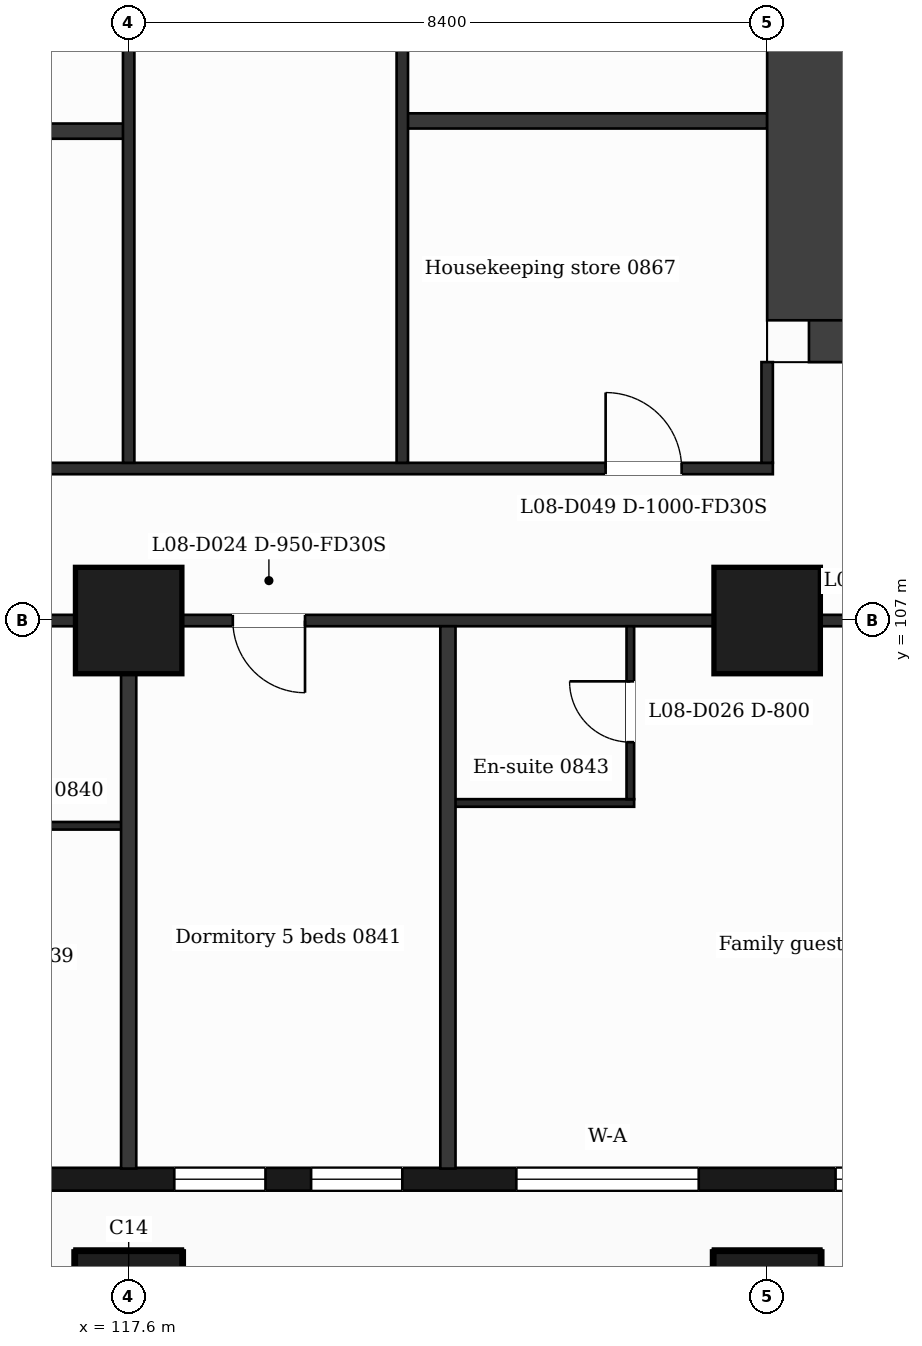
"""IFC4 building model, lengths in metres.
Left out: names, types, materials, properties, quantities, classifications, styles, units other than length and angle.
Written with IfcOpenShell. Run it as: python <this file> out.ifc"""

import sys

from ifc_helpers import new_model, si_unit, direction, frame, frame_2d, origin, origin_2d, place, context, subcontext, project, spatial, rectangle, extrude, element, fill, save


model = new_model("IFC4")
c1 = context("Model", 3, precision=1e-05, world=origin(), true_north=direction((0.0, 1.0)))
c2 = subcontext(c1, "Body", "Model", "MODEL_VIEW")
j1 = project(units=[si_unit("LENGTHUNIT", "METRE"), si_unit("PLANEANGLEUNIT", "RADIAN")], contexts=[c1])
p1 = place(None, origin())
s1 = spatial("IfcSite", under=j1, at=p1, CompositionType="ELEMENT")
p2 = place(p1, origin())
s2 = spatial("IfcBuilding", under=s1, at=p2, CompositionType="ELEMENT")
p3 = place(p2, frame((0.0, 0.0, 46.0)))
s3 = spatial("IfcBuildingStorey", under=s2, at=p3, CompositionType="ELEMENT", Elevation=46.0)
p4 = place(p3, frame((140.502, 110.95, 0.0), z_axis=(0.0, 0.0, 1.0), x_axis=(-1.0, 0.0, 0.0)))
e1 = element("IfcWall", 1, at=p4, inside=s3, PredefinedType="SHEAR", context=c2, shape_type="SweptSolid", body=[
    extrude(rectangle(XDim=13.952, YDim=1.1, at=frame_2d((6.976, 0.0))), origin(), (0.0, 0.0, 1.0), 3.5),
])
p5 = place(p4, frame((6.804, 0.0, 0.0)))
e2 = element("IfcOpeningElement", 2, at=p5, cuts=e1, PredefinedType="OPENING", context=c2, shape_type="SweptSolid", body=[
    extrude(rectangle(XDim=1.4, YDim=2.1, at=frame_2d((0.7, 1.05))), frame((0.0, 0.56, 0.0), z_axis=(0.0, -1.0, 0.0), x_axis=(1.0, 0.0, 0.0)), (0.0, 0.0, 1.0), 1.12),
])
p6 = place(p3, frame((126.55, 110.95, 0.0), z_axis=(0.0, 0.0, 1.0), x_axis=(0.0, 1.0, 0.0)))
e3 = element("IfcWall", 3, at=p6, inside=s3, PredefinedType="SHEAR", context=c2, shape_type="SweptSolid", body=[
    extrude(rectangle(XDim=20.9, YDim=1.1, at=frame_2d((10.45, 0.0))), origin(), (0.0, 0.0, 1.0), 3.5),
])
p7 = place(p6, frame((11.8, 0.0, 0.0)))
e4 = element("IfcOpeningElement", 4, at=p7, cuts=e3, PredefinedType="OPENING", context=c2, shape_type="SweptSolid", body=[
    extrude(rectangle(XDim=1.4, YDim=2.1, at=frame_2d((0.7, 1.05))), frame((0.0, 0.56, 0.0), z_axis=(0.0, -1.0, 0.0), x_axis=(1.0, 0.0, 0.0)), (0.0, 0.0, 1.0), 1.12),
])
for number, where, z_axis, x_axis in (
    (5, (117.6, 98.0, 0.0), (0.0, 0.0, 1.0), (1.0, 0.0, 0.0)),
    (6, (126.0, 98.0, 0.0), (0.0, 0.0, 1.0), (1.0, 0.0, 0.0)),
    (7, (117.6, 107.0, 0.0), (0.0, 0.0, 1.0), (1.0, 0.0, 0.0)),
    (8, (126.0, 107.0, 0.0), (0.0, 0.0, 1.0), (1.0, 0.0, 0.0)),
):
    element("IfcColumn", number, at=place(p3, frame(where, z_axis=z_axis, x_axis=x_axis)), inside=s3, PredefinedType="COLUMN", context=c2, shape_type="SweptSolid", body=[
        extrude(rectangle(XDim=1.4, YDim=1.4, at=origin_2d()), origin(), (0.0, 0.0, 1.0), 3.5),
    ])
p8 = place(p3, frame((89.85, 99.65, 0.0), z_axis=(0.0, 0.0, 1.0), x_axis=(1.0, 0.0, 0.0)))
e9 = element("IfcWall", 9, at=p8, inside=s3, PredefinedType="SOLIDWALL", context=c2, shape_type="SweptSolid", body=[
    extrude(rectangle(XDim=47.25, YDim=0.3, at=frame_2d((23.625, 0.0))), origin(), (0.0, 0.0, 1.0), 3.18),
])
p9 = place(p8, frame((0.725, 0.0, 0.9)))
e10 = element("IfcOpeningElement", 10, at=p9, cuts=e9, PredefinedType="OPENING", context=c2, shape_type="SweptSolid", body=[
    extrude(rectangle(XDim=1.2, YDim=2.1, at=frame_2d((0.6, 1.05))), frame((0.0, 0.16, 0.0), z_axis=(0.0, -1.0, 0.0), x_axis=(1.0, 0.0, 0.0)), (0.0, 0.0, 1.0), 0.32),
])
p10 = place(p8, frame((3.45, 0.0, 0.9)))
e11 = element("IfcOpeningElement", 11, at=p10, cuts=e9, PredefinedType="OPENING", context=c2, shape_type="SweptSolid", body=[
    extrude(rectangle(XDim=2.4, YDim=2.1, at=frame_2d((1.2, 1.05))), frame((0.0, 0.16, 0.0), z_axis=(0.0, -1.0, 0.0), x_axis=(1.0, 0.0, 0.0)), (0.0, 0.0, 1.0), 0.32),
])
p11 = place(p8, frame((7.65, 0.0, 0.9)))
e12 = element("IfcOpeningElement", 12, at=p11, cuts=e9, PredefinedType="OPENING", context=c2, shape_type="SweptSolid", body=[
    extrude(rectangle(XDim=2.4, YDim=2.1, at=frame_2d((1.2, 1.05))), frame((0.0, 0.16, 0.0), z_axis=(0.0, -1.0, 0.0), x_axis=(1.0, 0.0, 0.0)), (0.0, 0.0, 1.0), 0.32),
])
p12 = place(p8, frame((12.45, 0.0, 0.9)))
e13 = element("IfcOpeningElement", 13, at=p12, cuts=e9, PredefinedType="OPENING", context=c2, shape_type="SweptSolid", body=[
    extrude(rectangle(XDim=1.2, YDim=2.1, at=frame_2d((0.6, 1.05))), frame((0.0, 0.16, 0.0), z_axis=(0.0, -1.0, 0.0), x_axis=(1.0, 0.0, 0.0)), (0.0, 0.0, 1.0), 0.32),
])
p13 = place(p8, frame((16.65, 0.0, 0.9)))
e14 = element("IfcOpeningElement", 14, at=p13, cuts=e9, PredefinedType="OPENING", context=c2, shape_type="SweptSolid", body=[
    extrude(rectangle(XDim=1.2, YDim=2.1, at=frame_2d((0.6, 1.05))), frame((0.0, 0.16, 0.0), z_axis=(0.0, -1.0, 0.0), x_axis=(1.0, 0.0, 0.0)), (0.0, 0.0, 1.0), 0.32),
])
p14 = place(p8, frame((19.95, 0.0, 0.9)))
e15 = element("IfcOpeningElement", 15, at=p14, cuts=e9, PredefinedType="OPENING", context=c2, shape_type="SweptSolid", body=[
    extrude(rectangle(XDim=1.2, YDim=2.1, at=frame_2d((0.6, 1.05))), frame((0.0, 0.16, 0.0), z_axis=(0.0, -1.0, 0.0), x_axis=(1.0, 0.0, 0.0)), (0.0, 0.0, 1.0), 0.32),
])
p15 = place(p8, frame((21.75, 0.0, 0.9)))
e16 = element("IfcOpeningElement", 16, at=p15, cuts=e9, PredefinedType="OPENING", context=c2, shape_type="SweptSolid", body=[
    extrude(rectangle(XDim=1.2, YDim=2.1, at=frame_2d((0.6, 1.05))), frame((0.0, 0.16, 0.0), z_axis=(0.0, -1.0, 0.0), x_axis=(1.0, 0.0, 0.0)), (0.0, 0.0, 1.0), 0.32),
])
p16 = place(p8, frame((25.05, 0.0, 0.0)))
e17 = element("IfcOpeningElement", 17, at=p16, cuts=e9, PredefinedType="OPENING", context=c2, shape_type="SweptSolid", body=[
    extrude(rectangle(XDim=1.2, YDim=2.4, at=frame_2d((0.6, 1.2))), frame((0.0, 0.16, 0.0), z_axis=(0.0, -1.0, 0.0), x_axis=(1.0, 0.0, 0.0)), (0.0, 0.0, 1.0), 0.32),
])
p17 = place(p8, frame((28.35, 0.0, 0.9)))
e18 = element("IfcOpeningElement", 18, at=p17, cuts=e9, PredefinedType="OPENING", context=c2, shape_type="SweptSolid", body=[
    extrude(rectangle(XDim=1.2, YDim=2.1, at=frame_2d((0.6, 1.05))), frame((0.0, 0.16, 0.0), z_axis=(0.0, -1.0, 0.0), x_axis=(1.0, 0.0, 0.0)), (0.0, 0.0, 1.0), 0.32),
])
p18 = place(p8, frame((30.15, 0.0, 0.9)))
e19 = element("IfcOpeningElement", 19, at=p18, cuts=e9, PredefinedType="OPENING", context=c2, shape_type="SweptSolid", body=[
    extrude(rectangle(XDim=1.2, YDim=2.1, at=frame_2d((0.6, 1.05))), frame((0.0, 0.16, 0.0), z_axis=(0.0, -1.0, 0.0), x_axis=(1.0, 0.0, 0.0)), (0.0, 0.0, 1.0), 0.32),
])
p19 = place(p8, frame((32.85, 0.0, 0.9)))
e20 = element("IfcOpeningElement", 20, at=p19, cuts=e9, PredefinedType="OPENING", context=c2, shape_type="SweptSolid", body=[
    extrude(rectangle(XDim=2.4, YDim=2.1, at=frame_2d((1.2, 1.05))), frame((0.0, 0.16, 0.0), z_axis=(0.0, -1.0, 0.0), x_axis=(1.0, 0.0, 0.0)), (0.0, 0.0, 1.0), 0.32),
])
p20 = place(p8, frame((37.05, 0.0, 0.9)))
e21 = element("IfcOpeningElement", 21, at=p20, cuts=e9, PredefinedType="OPENING", context=c2, shape_type="SweptSolid", body=[
    extrude(rectangle(XDim=2.4, YDim=2.1, at=frame_2d((1.2, 1.05))), frame((0.0, 0.16, 0.0), z_axis=(0.0, -1.0, 0.0), x_axis=(1.0, 0.0, 0.0)), (0.0, 0.0, 1.0), 0.32),
])
p21 = place(p8, frame((41.85, 0.0, 0.9)))
e22 = element("IfcOpeningElement", 22, at=p21, cuts=e9, PredefinedType="OPENING", context=c2, shape_type="SweptSolid", body=[
    extrude(rectangle(XDim=1.2, YDim=2.1, at=frame_2d((0.6, 1.05))), frame((0.0, 0.16, 0.0), z_axis=(0.0, -1.0, 0.0), x_axis=(1.0, 0.0, 0.0)), (0.0, 0.0, 1.0), 0.32),
])
p22 = place(p8, frame((45.25, 0.0, 0.9)))
e23 = element("IfcOpeningElement", 23, at=p22, cuts=e9, PredefinedType="OPENING", context=c2, shape_type="SweptSolid", body=[
    extrude(rectangle(XDim=1.2, YDim=2.1, at=frame_2d((0.6, 1.05))), frame((0.0, 0.16, 0.0), z_axis=(0.0, -1.0, 0.0), x_axis=(1.0, 0.0, 0.0)), (0.0, 0.0, 1.0), 0.32),
])
p23 = place(p3, frame((115.15, 104.3, 0.0), z_axis=(0.0, 0.0, 1.0), x_axis=(1.0, 0.0, 0.0)))
e24 = element("IfcWall", 24, at=p23, inside=s3, PredefinedType="PARTITIONING", context=c2, shape_type="SweptSolid", body=[
    extrude(rectangle(XDim=2.45, YDim=0.1, at=frame_2d((1.225, 0.0))), origin(), (0.0, 0.0, 1.0), 3.18),
])
p24 = place(p3, frame((121.8, 104.6, 0.0), z_axis=(0.0, 0.0, 1.0), x_axis=(1.0, 0.0, 0.0)))
e25 = element("IfcWall", 25, at=p24, inside=s3, PredefinedType="PARTITIONING", context=c2, shape_type="SweptSolid", body=[
    extrude(rectangle(XDim=2.45, YDim=0.1, at=frame_2d((1.225, 0.0))), origin(), (0.0, 0.0, 1.0), 3.18),
])
p25 = place(p3, frame((87.018, 107.0, 0.0), z_axis=(0.0, 0.0, 1.0), x_axis=(1.0, 0.0, 0.0)))
e26 = element("IfcWall", 26, at=p25, inside=s3, PredefinedType="PARTITIONING", context=c2, shape_type="SweptSolid", body=[
    extrude(rectangle(XDim=52.765, YDim=0.15, at=frame_2d((26.382, 0.0))), origin(), (0.0, 0.0, 1.0), 3.18),
])
p26 = place(p25, frame((1.032, 0.0, 0.0)))
e27 = element("IfcOpeningElement", 27, at=p26, cuts=e26, PredefinedType="OPENING", context=c2, shape_type="SweptSolid", body=[
    extrude(rectangle(XDim=0.95, YDim=2.1, at=frame_2d((0.475, 1.05))), frame((0.0, 0.085, 0.0), z_axis=(0.0, -1.0, 0.0), x_axis=(1.0, 0.0, 0.0)), (0.0, 0.0, 1.0), 0.17),
])
p27 = place(p25, frame((6.369, 0.0, 0.0)))
e28 = element("IfcOpeningElement", 28, at=p27, cuts=e26, PredefinedType="OPENING", context=c2, shape_type="SweptSolid", body=[
    extrude(rectangle(XDim=0.95, YDim=2.1, at=frame_2d((0.475, 1.05))), frame((0.0, 0.085, 0.0), z_axis=(0.0, -1.0, 0.0), x_axis=(1.0, 0.0, 0.0)), (0.0, 0.0, 1.0), 0.17),
])
p28 = place(p25, frame((10.952, 0.0, 0.0)))
e29 = element("IfcOpeningElement", 29, at=p28, cuts=e26, PredefinedType="OPENING", context=c2, shape_type="SweptSolid", body=[
    extrude(rectangle(XDim=0.95, YDim=2.1, at=frame_2d((0.475, 1.05))), frame((0.0, 0.085, 0.0), z_axis=(0.0, -1.0, 0.0), x_axis=(1.0, 0.0, 0.0)), (0.0, 0.0, 1.0), 0.17),
])
p29 = place(p25, frame((16.045, 0.0, 0.0)))
e30 = element("IfcOpeningElement", 30, at=p29, cuts=e26, PredefinedType="OPENING", context=c2, shape_type="SweptSolid", body=[
    extrude(rectangle(XDim=0.95, YDim=2.1, at=frame_2d((0.475, 1.05))), frame((0.0, 0.085, 0.0), z_axis=(0.0, -1.0, 0.0), x_axis=(1.0, 0.0, 0.0)), (0.0, 0.0, 1.0), 0.17),
])
p30 = place(p25, frame((20.245, 0.0, 0.0)))
e31 = element("IfcOpeningElement", 31, at=p30, cuts=e26, PredefinedType="OPENING", context=c2, shape_type="SweptSolid", body=[
    extrude(rectangle(XDim=0.95, YDim=2.1, at=frame_2d((0.475, 1.05))), frame((0.0, 0.085, 0.0), z_axis=(0.0, -1.0, 0.0), x_axis=(1.0, 0.0, 0.0)), (0.0, 0.0, 1.0), 0.17),
])
p31 = place(p25, frame((24.969, 0.0, 0.0)))
e32 = element("IfcOpeningElement", 32, at=p31, cuts=e26, PredefinedType="OPENING", context=c2, shape_type="SweptSolid", body=[
    extrude(rectangle(XDim=0.95, YDim=2.1, at=frame_2d((0.475, 1.05))), frame((0.0, 0.085, 0.0), z_axis=(0.0, -1.0, 0.0), x_axis=(1.0, 0.0, 0.0)), (0.0, 0.0, 1.0), 0.17),
])
p32 = place(p25, frame((26.807, 0.0, 0.0)))
e33 = element("IfcOpeningElement", 33, at=p32, cuts=e26, PredefinedType="OPENING", context=c2, shape_type="SweptSolid", body=[
    extrude(rectangle(XDim=0.95, YDim=2.1, at=frame_2d((0.475, 1.05))), frame((0.0, 0.085, 0.0), z_axis=(0.0, -1.0, 0.0), x_axis=(1.0, 0.0, 0.0)), (0.0, 0.0, 1.0), 0.17),
])
p33 = place(p25, frame((31.952, 0.0, 0.0)))
e34 = element("IfcOpeningElement", 34, at=p33, cuts=e26, PredefinedType="OPENING", context=c2, shape_type="SweptSolid", body=[
    extrude(rectangle(XDim=0.95, YDim=2.1, at=frame_2d((0.475, 1.05))), frame((0.0, 0.085, 0.0), z_axis=(0.0, -1.0, 0.0), x_axis=(1.0, 0.0, 0.0)), (0.0, 0.0, 1.0), 0.17),
])
p34 = place(p25, frame((40.795, 0.0, 0.0)))
e35 = element("IfcOpeningElement", 35, at=p34, cuts=e26, PredefinedType="OPENING", context=c2, shape_type="SweptSolid", body=[
    extrude(rectangle(XDim=0.95, YDim=2.1, at=frame_2d((0.475, 1.05))), frame((0.0, 0.085, 0.0), z_axis=(0.0, -1.0, 0.0), x_axis=(1.0, 0.0, 0.0)), (0.0, 0.0, 1.0), 0.17),
])
p35 = place(p25, frame((43.644, 0.0, 0.0)))
e36 = element("IfcOpeningElement", 36, at=p35, cuts=e26, PredefinedType="OPENING", context=c2, shape_type="SweptSolid", body=[
    extrude(rectangle(XDim=0.95, YDim=2.1, at=frame_2d((0.475, 1.05))), frame((0.0, 0.085, 0.0), z_axis=(0.0, -1.0, 0.0), x_axis=(1.0, 0.0, 0.0)), (0.0, 0.0, 1.0), 0.17),
])
p36 = place(p25, frame((48.767, 0.0, 0.0)))
e37 = element("IfcOpeningElement", 37, at=p36, cuts=e26, PredefinedType="OPENING", context=c2, shape_type="SweptSolid", body=[
    extrude(rectangle(XDim=0.95, YDim=2.1, at=frame_2d((0.475, 1.05))), frame((0.0, 0.085, 0.0), z_axis=(0.0, -1.0, 0.0), x_axis=(1.0, 0.0, 0.0)), (0.0, 0.0, 1.0), 0.17),
])
p37 = place(p3, frame((100.725, 109.0, 0.0), z_axis=(0.0, 0.0, 1.0), x_axis=(1.0, 0.0, 0.0)))
e38 = element("IfcWall", 38, at=p37, inside=s3, PredefinedType="PARTITIONING", context=c2, shape_type="SweptSolid", body=[
    extrude(rectangle(XDim=25.35, YDim=0.15, at=frame_2d((12.675, 0.0))), origin(), (0.0, 0.0, 1.0), 3.18),
])
p38 = place(p37, frame((1.2, 0.0, 0.0)))
e39 = element("IfcOpeningElement", 39, at=p38, cuts=e38, PredefinedType="OPENING", context=c2, shape_type="SweptSolid", body=[
    extrude(rectangle(XDim=1.0, YDim=2.1, at=frame_2d((0.5, 1.05))), frame((0.0, 0.085, 0.0), z_axis=(0.0, -1.0, 0.0), x_axis=(1.0, 0.0, 0.0)), (0.0, 0.0, 1.0), 0.17),
])
p39 = place(p37, frame((12.845, 0.0, 0.0)))
e40 = element("IfcOpeningElement", 40, at=p39, cuts=e38, PredefinedType="OPENING", context=c2, shape_type="SweptSolid", body=[
    extrude(rectangle(XDim=1.0, YDim=2.1, at=frame_2d((0.5, 1.05))), frame((0.0, 0.085, 0.0), z_axis=(0.0, -1.0, 0.0), x_axis=(1.0, 0.0, 0.0)), (0.0, 0.0, 1.0), 0.17),
])
p40 = place(p37, frame((23.15, 0.0, 0.0)))
e41 = element("IfcOpeningElement", 41, at=p40, cuts=e38, PredefinedType="OPENING", context=c2, shape_type="SweptSolid", body=[
    extrude(rectangle(XDim=1.0, YDim=2.1, at=frame_2d((0.5, 1.05))), frame((0.0, 0.085, 0.0), z_axis=(0.0, -1.0, 0.0), x_axis=(1.0, 0.0, 0.0)), (0.0, 0.0, 1.0), 0.17),
])
p41 = place(p3, frame((109.2, 113.438, 0.0), z_axis=(0.0, 0.0, 1.0), x_axis=(1.0, 0.0, 0.0)))
e42 = element("IfcWall", 42, at=p41, inside=s3, PredefinedType="PARTITIONING", context=c2, shape_type="SweptSolid", body=[
    extrude(rectangle(XDim=8.4, YDim=0.2, at=frame_2d((4.2, 0.0))), origin(), (0.0, 0.0, 1.0), 3.18),
])
p42 = place(p3, frame((121.2, 113.573, 0.0), z_axis=(0.0, 0.0, 1.0), x_axis=(1.0, 0.0, 0.0)))
e43 = element("IfcWall", 43, at=p42, inside=s3, PredefinedType="PARTITIONING", context=c2, shape_type="SweptSolid", body=[
    extrude(rectangle(XDim=4.8, YDim=0.2, at=frame_2d((2.4, 0.0))), origin(), (0.0, 0.0, 1.0), 3.18),
])
p43 = place(p3, frame((117.6, 99.79, 0.0), z_axis=(0.0, 0.0, 1.0), x_axis=(0.0, 1.0, 0.0)))
e44 = element("IfcWall", 44, at=p43, inside=s3, PredefinedType="PARTITIONING", context=c2, shape_type="SweptSolid", body=[
    extrude(rectangle(XDim=7.135, YDim=0.2, at=frame_2d((3.567, 0.0))), origin(), (0.0, 0.0, 1.0), 3.18),
])
p44 = place(p3, frame((117.6, 109.075, 0.0), z_axis=(0.0, 0.0, 1.0), x_axis=(0.0, 1.0, 0.0)))
e45 = element("IfcWall", 45, at=p44, inside=s3, PredefinedType="PARTITIONING", context=c2, shape_type="SweptSolid", body=[
    extrude(rectangle(XDim=13.3, YDim=0.15, at=frame_2d((6.65, 0.0))), origin(), (0.0, 0.0, 1.0), 3.18),
])
p45 = place(p44, frame((9.1, 0.0, 0.0)))
e46 = element("IfcOpeningElement", 46, at=p45, cuts=e45, PredefinedType="OPENING", context=c2, shape_type="SweptSolid", body=[
    extrude(rectangle(XDim=1.0, YDim=2.1, at=frame_2d((0.5, 1.05))), frame((0.0, 0.085, 0.0), z_axis=(0.0, -1.0, 0.0), x_axis=(1.0, 0.0, 0.0)), (0.0, 0.0, 1.0), 0.17),
])
p46 = place(p3, frame((121.2, 109.075, 0.0), z_axis=(0.0, 0.0, 1.0), x_axis=(0.0, 1.0, 0.0)))
e47 = element("IfcWall", 47, at=p46, inside=s3, PredefinedType="PARTITIONING", context=c2, shape_type="SweptSolid", body=[
    extrude(rectangle(XDim=13.3, YDim=0.15, at=frame_2d((6.65, 0.0))), origin(), (0.0, 0.0, 1.0), 3.18),
])
p47 = place(p46, frame((9.154, 0.0, 0.0)))
e48 = element("IfcOpeningElement", 48, at=p47, cuts=e47, PredefinedType="OPENING", context=c2, shape_type="SweptSolid", body=[
    extrude(rectangle(XDim=1.0, YDim=2.1, at=frame_2d((0.5, 1.05))), frame((0.0, 0.085, 0.0), z_axis=(0.0, -1.0, 0.0), x_axis=(1.0, 0.0, 0.0)), (0.0, 0.0, 1.0), 0.17),
])
p48 = place(p3, frame((121.8, 99.79, 0.0), z_axis=(0.0, 0.0, 1.0), x_axis=(0.0, 1.0, 0.0)))
e49 = element("IfcWall", 49, at=p48, inside=s3, PredefinedType="PARTITIONING", context=c2, shape_type="SweptSolid", body=[
    extrude(rectangle(XDim=7.135, YDim=0.2, at=frame_2d((3.567, 0.0))), origin(), (0.0, 0.0, 1.0), 3.18),
])
p49 = place(p3, frame((124.2, 104.65, 0.0), z_axis=(0.0, 0.0, 1.0), x_axis=(0.0, 1.0, 0.0)))
e50 = element("IfcWall", 50, at=p49, inside=s3, PredefinedType="PARTITIONING", context=c2, shape_type="SweptSolid", body=[
    extrude(rectangle(XDim=2.275, YDim=0.1, at=frame_2d((1.138, 0.0))), origin(), (0.0, 0.0, 1.0), 3.18),
])
p50 = place(p49, frame((0.75, 0.0, 0.0)))
e51 = element("IfcOpeningElement", 51, at=p50, cuts=e50, PredefinedType="OPENING", context=c2, shape_type="SweptSolid", body=[
    extrude(rectangle(XDim=0.8, YDim=2.1, at=frame_2d((0.4, 1.05))), frame((0.0, 0.06, 0.0), z_axis=(0.0, -1.0, 0.0), x_axis=(1.0, 0.0, 0.0)), (0.0, 0.0, 1.0), 0.12),
])
p51 = place(p3, frame((126.0, 109.075, 0.0), z_axis=(0.0, 0.0, 1.0), x_axis=(0.0, 1.0, 0.0)))
e52 = element("IfcWall", 52, at=p51, inside=s3, PredefinedType="PARTITIONING", context=c2, shape_type="SweptSolid", body=[
    extrude(rectangle(XDim=1.325, YDim=0.15, at=frame_2d((0.663, 0.0))), origin(), (0.0, 0.0, 1.0), 3.18),
])
p52 = place(p17, origin())
e53 = element("IfcWindow", 53, at=p52, inside=s3, PartitioningType="SINGLE_PANEL", PredefinedType="WINDOW", context=c2, shape_type="SweptSolid", body=[
    extrude(rectangle(XDim=1.2, YDim=2.1, at=frame_2d((0.6, 1.05))), frame((0.0, 0.03, 0.0), z_axis=(0.0, -1.0, 0.0), x_axis=(1.0, 0.0, 0.0)), (0.0, 0.0, 1.0), 0.06),
])
fill(e18, e53)
p53 = place(p18, origin())
e54 = element("IfcWindow", 54, at=p53, inside=s3, PartitioningType="SINGLE_PANEL", PredefinedType="WINDOW", context=c2, shape_type="SweptSolid", body=[
    extrude(rectangle(XDim=1.2, YDim=2.1, at=frame_2d((0.6, 1.05))), frame((0.0, 0.03, 0.0), z_axis=(0.0, -1.0, 0.0), x_axis=(1.0, 0.0, 0.0)), (0.0, 0.0, 1.0), 0.06),
])
fill(e19, e54)
p54 = place(p19, origin())
e55 = element("IfcWindow", 55, at=p54, inside=s3, PartitioningType="SINGLE_PANEL", PredefinedType="WINDOW", context=c2, shape_type="SweptSolid", body=[
    extrude(rectangle(XDim=2.4, YDim=2.1, at=frame_2d((1.2, 1.05))), frame((0.0, 0.03, 0.0), z_axis=(0.0, -1.0, 0.0), x_axis=(1.0, 0.0, 0.0)), (0.0, 0.0, 1.0), 0.06),
])
fill(e20, e55)
p55 = place(p20, origin())
e56 = element("IfcWindow", 56, at=p55, inside=s3, PartitioningType="SINGLE_PANEL", PredefinedType="WINDOW", context=c2, shape_type="SweptSolid", body=[
    extrude(rectangle(XDim=2.4, YDim=2.1, at=frame_2d((1.2, 1.05))), frame((0.0, 0.03, 0.0), z_axis=(0.0, -1.0, 0.0), x_axis=(1.0, 0.0, 0.0)), (0.0, 0.0, 1.0), 0.06),
])
fill(e21, e56)
p56 = place(p33, origin())
e57 = element("IfcDoor", 57, at=p56, inside=s3, OperationType="SINGLE_SWING_RIGHT", PredefinedType="DOOR", context=c2, shape_type="SweptSolid", body=[
    extrude(rectangle(XDim=0.95, YDim=2.1, at=frame_2d((0.475, 1.05))), frame((0.0, 0.025, 0.0), z_axis=(0.0, -1.0, 0.0), x_axis=(1.0, 0.0, 0.0)), (0.0, 0.0, 1.0), 0.05),
])
fill(e34, e57)
p57 = place(p50, origin())
e58 = element("IfcDoor", 58, at=p57, inside=s3, OperationType="SINGLE_SWING_RIGHT", PredefinedType="DOOR", context=c2, shape_type="SweptSolid", body=[
    extrude(rectangle(XDim=0.8, YDim=2.1, at=frame_2d((0.4, 1.05))), frame((0.0, 0.025, 0.0), z_axis=(0.0, -1.0, 0.0), x_axis=(1.0, 0.0, 0.0)), (0.0, 0.0, 1.0), 0.05),
])
fill(e51, e58)
p58 = place(p40, origin())
e59 = element("IfcDoor", 59, at=p58, inside=s3, OperationType="SINGLE_SWING_LEFT", PredefinedType="DOOR", context=c2, shape_type="SweptSolid", body=[
    extrude(rectangle(XDim=1.0, YDim=2.1, at=frame_2d((0.5, 1.05))), frame((0.0, 0.025, 0.0), z_axis=(0.0, -1.0, 0.0), x_axis=(1.0, 0.0, 0.0)), (0.0, 0.0, 1.0), 0.05),
])
fill(e41, e59)
save(model, sys.argv[1])
